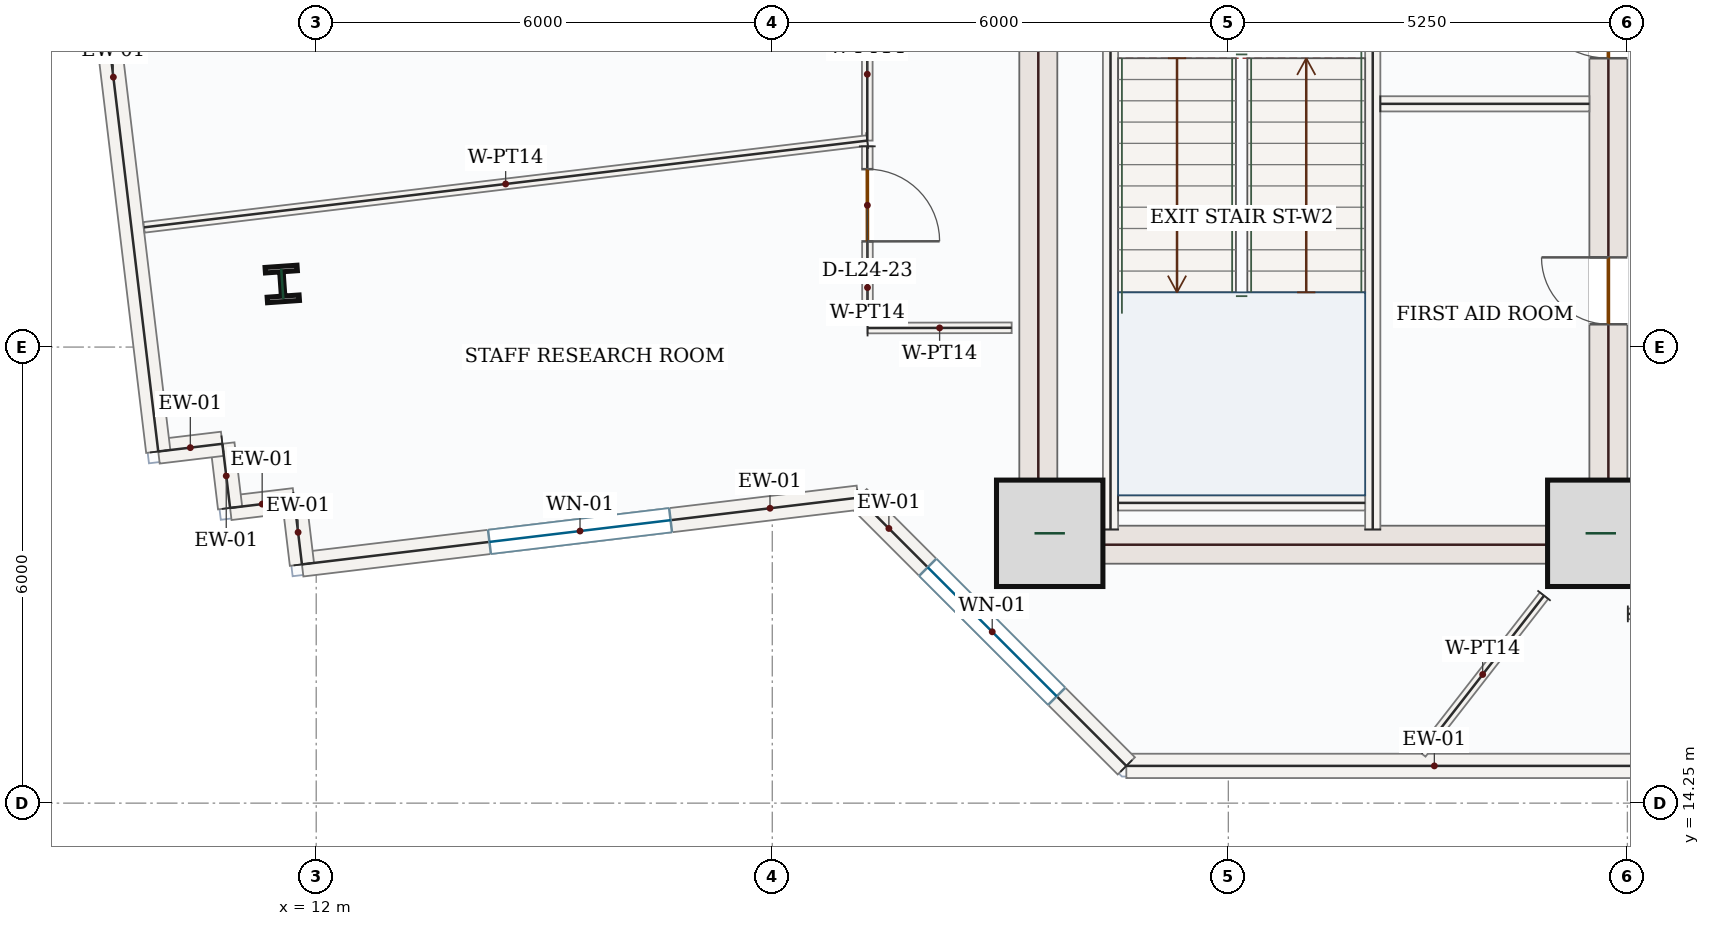
"""IFC4 building model, lengths in metres.
Left out: names, types, materials, properties, quantities, classifications, styles, units other than length and angle.
Written with IfcOpenShell. Run it as: python <this file> out.ifc"""

import sys

from ifc_helpers import new_model, si_unit, direction, frame, frame_2d, origin, origin_2d, place, context, subcontext, project, spatial, rectangle, i_section, extrude, source, transform, mapped, element, fill, save


model = new_model("IFC4")
c1 = context("Model", 3, precision=1e-05, world=origin(), true_north=direction((0.0, 1.0)))
c2 = subcontext(c1, "Body", "Model", "MODEL_VIEW")
j1 = project(units=[si_unit("LENGTHUNIT", "METRE"), si_unit("PLANEANGLEUNIT", "RADIAN")], contexts=[c1])
p1 = place(None, origin())
s1 = spatial("IfcSite", under=j1, at=p1, CompositionType="ELEMENT")
p2 = place(p1, origin())
s2 = spatial("IfcBuilding", under=s1, at=p2, CompositionType="ELEMENT")
p3 = place(p2, frame((0.0, 0.0, 108.9)))
s3 = spatial("IfcBuildingStorey", under=s2, at=p3, CompositionType="ELEMENT", Elevation=108.9)
m1 = source(origin(), c2, "Body", "SweptSolid", [
    extrude(rectangle(XDim=8.55, YDim=0.5, at=frame_2d((4.275, 0.0))), origin(), (0.0, 0.0, 1.0), 3.95),
])
p4 = place(p3, frame((21.5, 17.4, 0.0), z_axis=(0.0, 0.0, 1.0), x_axis=(0.0, 1.0, 0.0)))
e1 = element("IfcWall", 1, at=p4, inside=s3, PredefinedType="SHEAR", context=c2, shape_type="MappedRepresentation", body=[
    mapped(m1, transform((0.0, 0.0, 0.0), x_axis=(1.0, 0.0, 0.0), y_axis=(0.0, 1.0, 0.0), z_axis=(0.0, 0.0, 1.0), scale=1.0)),
])
p5 = place(p3, frame((29.0, 17.4, 0.0), z_axis=(0.0, 0.0, 1.0), x_axis=(0.0, 1.0, 0.0)))
e2 = element("IfcWall", 2, at=p5, inside=s3, PredefinedType="SHEAR", context=c2, shape_type="SweptSolid", body=[
    extrude(rectangle(XDim=8.55, YDim=0.5, at=frame_2d((4.275, 0.0))), origin(), (0.0, 0.0, 1.0), 3.95),
])
p6 = place(p5, frame((6.65, 0.0, 0.0)))
e3 = element("IfcOpeningElement", 3, at=p6, cuts=e2, PredefinedType="OPENING", context=c2, shape_type="SweptSolid", body=[
    extrude(rectangle(XDim=1.1, YDim=2.2, at=frame_2d((0.55, 1.1))), frame((0.0, 0.26, 0.0), z_axis=(0.0, -1.0, 0.0), x_axis=(1.0, 0.0, 0.0)), (0.0, 0.0, 1.0), 0.52),
])
p7 = place(p5, frame((3.15, 0.0, 0.0)))
e4 = element("IfcOpeningElement", 4, at=p7, cuts=e2, PredefinedType="OPENING", context=c2, shape_type="SweptSolid", body=[
    extrude(rectangle(XDim=0.88, YDim=2.1, at=frame_2d((0.44, 1.05))), frame((0.0, 0.26, 0.0), z_axis=(0.0, -1.0, 0.0), x_axis=(1.0, 0.0, 0.0)), (0.0, 0.0, 1.0), 0.52),
])
m2 = source(origin(), c2, "Body", "SweptSolid", [
    extrude(rectangle(XDim=7.0, YDim=0.5, at=frame_2d((3.5, 0.0))), origin(), (0.0, 0.0, 1.0), 3.95),
])
p8 = place(p3, frame((21.75, 17.65, 0.0), z_axis=(0.0, 0.0, 1.0), x_axis=(1.0, 0.0, 0.0)))
e5 = element("IfcWall", 5, at=p8, inside=s3, PredefinedType="SHEAR", context=c2, shape_type="MappedRepresentation", body=[
    mapped(m2, transform((0.0, 0.0, 0.0), x_axis=(1.0, 0.0, 0.0), y_axis=(0.0, 1.0, 0.0), z_axis=(0.0, 0.0, 1.0), scale=1.0)),
])
m3 = source(origin(), c2, "Body", "SweptSolid", [
    extrude(rectangle(XDim=1.4, YDim=1.4, at=origin_2d()), origin(), (0.0, 0.0, 1.0), 4.2),
])
for number, where, z_axis, x_axis in (
    (6, (21.65, 17.8, 0.0), (0.0, 0.0, 1.0), (1.0, 0.0, 0.0)),
    (7, (28.9, 17.8, 0.0), (0.0, 0.0, 1.0), (1.0, 0.0, 0.0)),
):
    element("IfcColumn", number, at=place(p3, frame(where, z_axis=z_axis, x_axis=x_axis)), inside=s3, PredefinedType="COLUMN", context=c2, shape_type="MappedRepresentation", body=[
        mapped(m3, transform((0.0, 0.0, 0.0), x_axis=(1.0, 0.0, 0.0), y_axis=(0.0, 1.0, 0.0), z_axis=(0.0, 0.0, 1.0), scale=1.0)),
    ])
m4 = source(origin(), c2, "Body", "SweptSolid", [
    extrude(i_section(OverallWidth=0.421, OverallDepth=0.465, WebThickness=0.045, FlangeThickness=0.073, FilletRadius=0.018, at=origin_2d()), origin(), (0.0, 0.0, 1.0), 4.2),
])
p9 = place(p3, frame((11.553, 21.08, 0.0), z_axis=(0.0, 0.0, 1.0), x_axis=(0.99756405026, 0.069756473744, 0.0)))
e8 = element("IfcColumn", 8, at=p9, inside=s3, PredefinedType="COLUMN", context=c2, shape_type="MappedRepresentation", body=[
    mapped(m4, transform((0.0, 0.0, 0.0), x_axis=(1.0, 0.0, 0.0), y_axis=(0.0, 1.0, 0.0), z_axis=(0.0, 0.0, 1.0), scale=1.0)),
])
m5 = source(origin(), c2, "Body", "SweptSolid", [
    extrude(rectangle(XDim=8.105, YDim=0.32, at=frame_2d((4.052, 0.0))), origin(), (0.0, 0.0, 1.0), 3.95),
])
p10 = place(p3, frame((30.763, 14.74, 0.0), z_axis=(0.0, 0.0, 1.0), x_axis=(-1.0, 0.0, 0.0)))
e9 = element("IfcWall", 9, at=p10, inside=s3, PredefinedType="SOLIDWALL", context=c2, shape_type="MappedRepresentation", body=[
    mapped(m5, transform((0.0, 0.0, 0.0), x_axis=(1.0, 0.0, 0.0), y_axis=(0.0, 1.0, 0.0), z_axis=(0.0, 0.0, 1.0), scale=1.0)),
])
p11 = place(p3, frame((22.658, 14.74, 0.0), z_axis=(0.0, 0.0, 1.0), x_axis=(-0.707106781187, 0.707106781187, 0.0)))
e10 = element("IfcWall", 10, at=p11, inside=s3, PredefinedType="SOLIDWALL", context=c2, shape_type="SweptSolid", body=[
    extrude(rectangle(XDim=4.99, YDim=0.32, at=frame_2d((2.495, 0.0))), origin(), (0.0, 0.0, 1.0), 3.95),
])
p12 = place(p11, frame((1.295, 0.0, 0.85)))
e11 = element("IfcOpeningElement", 11, at=p12, cuts=e10, PredefinedType="OPENING", context=c2, shape_type="SweptSolid", body=[
    extrude(rectangle(XDim=2.4, YDim=1.8, at=frame_2d((1.2, 0.9))), frame((0.0, 0.17, 0.0), z_axis=(0.0, -1.0, 0.0), x_axis=(1.0, 0.0, 0.0)), (0.0, 0.0, 1.0), 0.34),
])
p13 = place(p3, frame((19.129, 18.269, 0.0), z_axis=(0.0, 0.0, 1.0), x_axis=(-0.992882794037, -0.119095580547, 0.0)))
e12 = element("IfcWall", 12, at=p13, inside=s3, PredefinedType="SOLIDWALL", context=c2, shape_type="SweptSolid", body=[
    extrude(rectangle(XDim=7.37, YDim=0.32, at=frame_2d((3.685, 0.0))), origin(), (0.0, 0.0, 1.0), 3.95),
])
p14 = place(p13, frame((2.485, 0.0, 0.85)))
e13 = element("IfcOpeningElement", 13, at=p14, cuts=e12, PredefinedType="OPENING", context=c2, shape_type="SweptSolid", body=[
    extrude(rectangle(XDim=2.4, YDim=1.8, at=frame_2d((1.2, 0.9))), frame((0.0, 0.17, 0.0), z_axis=(0.0, -1.0, 0.0), x_axis=(1.0, 0.0, 0.0)), (0.0, 0.0, 1.0), 0.34),
])
m6 = source(origin(), c2, "Body", "SweptSolid", [
    extrude(rectangle(XDim=0.85, YDim=0.32, at=frame_2d((0.425, 0.0))), origin(), (0.0, 0.0, 1.0), 3.95),
])
for number, where, z_axis, x_axis in (
    (14, (11.812, 17.391, 0.0), (0.0, 0.0, 1.0), (-0.119, 0.993, 0.0)),
    (15, (11.711, 18.235, 0.0), (0.0, 0.0, 1.0), (-0.993, -0.119, 0.0)),
):
    element("IfcWall", number, at=place(p3, frame(where, z_axis=z_axis, x_axis=x_axis)), inside=s3, PredefinedType="SOLIDWALL", context=c2, shape_type="MappedRepresentation", body=[
        mapped(m6, transform((0.0, 0.0, 0.0), x_axis=(1.0, 0.0, 0.0), y_axis=(0.0, 1.0, 0.0), z_axis=(0.0, 0.0, 1.0), scale=1.0)),
    ])
m7 = source(origin(), c2, "Body", "SweptSolid", [
    extrude(rectangle(XDim=0.85, YDim=0.32, at=frame_2d((0.425, 0.0))), origin(), (0.0, 0.0, 1.0), 3.95),
])
p15 = place(p3, frame((10.867, 18.134, 0.0), z_axis=(0.0, 0.0, 1.0), x_axis=(-0.11894130009, 0.992901287708, 0.0)))
e16 = element("IfcWall", 16, at=p15, inside=s3, PredefinedType="SOLIDWALL", context=c2, shape_type="MappedRepresentation", body=[
    mapped(m7, transform((0.0, 0.0, 0.0), x_axis=(1.0, 0.0, 0.0), y_axis=(0.0, 1.0, 0.0), z_axis=(0.0, 0.0, 1.0), scale=1.0)),
])
p16 = place(p3, frame((10.766, 18.978, 0.0), z_axis=(0.0, 0.0, 1.0), x_axis=(-0.992905350382, -0.118907380694, 0.0)))
e17 = element("IfcWall", 17, at=p16, inside=s3, PredefinedType="SOLIDWALL", context=c2, shape_type="MappedRepresentation", body=[
    mapped(m6, transform((0.0, 0.0, 0.0), x_axis=(1.0, 0.0, 0.0), y_axis=(0.0, 1.0, 0.0), z_axis=(0.0, 0.0, 1.0), scale=1.0)),
])
m8 = source(origin(), c2, "Body", "SweptSolid", [
    extrude(rectangle(XDim=9.92, YDim=0.32, at=frame_2d((4.96, 0.0))), origin(), (0.0, 0.0, 1.0), 3.95),
])
p17 = place(p3, frame((9.922, 18.876, 0.0), z_axis=(0.0, 0.0, 1.0), x_axis=(-0.119092815244, 0.992883125729, 0.0)))
e18 = element("IfcWall", 18, at=p17, inside=s3, PredefinedType="SOLIDWALL", context=c2, shape_type="MappedRepresentation", body=[
    mapped(m8, transform((0.0, 0.0, 0.0), x_axis=(1.0, 0.0, 0.0), y_axis=(0.0, 1.0, 0.0), z_axis=(0.0, 0.0, 1.0), scale=1.0)),
])
m9 = source(origin(), c2, "Body", "SweptSolid", [
    extrude(rectangle(XDim=7.87, YDim=0.2, at=frame_2d((3.935, 0.0))), origin(), (0.0, 0.0, 1.0), 3.95),
])
p18 = place(p3, frame((22.45, 17.85, 0.0), z_axis=(0.0, 0.0, 1.0), x_axis=(0.0, 1.0, 0.0)))
e19 = element("IfcWall", 19, at=p18, inside=s3, PredefinedType="SOLIDWALL", context=c2, shape_type="MappedRepresentation", body=[
    mapped(m9, transform((0.0, 0.0, 0.0), x_axis=(1.0, 0.0, 0.0), y_axis=(0.0, 1.0, 0.0), z_axis=(0.0, 0.0, 1.0), scale=1.0)),
])
p19 = place(p3, frame((25.9, 17.85, 0.0), z_axis=(0.0, 0.0, 1.0), x_axis=(0.0, 1.0, 0.0)))
e20 = element("IfcWall", 20, at=p19, inside=s3, PredefinedType="SOLIDWALL", context=c2, shape_type="SweptSolid", body=[
    extrude(rectangle(XDim=8.0, YDim=0.2, at=frame_2d((4.0, 0.0))), origin(), (0.0, 0.0, 1.0), 3.95),
])
p20 = place(p19, frame((6.3, 0.0, 0.0)))
e21 = element("IfcOpeningElement", 21, at=p20, cuts=e20, PredefinedType="OPENING", context=c2, shape_type="SweptSolid", body=[
    extrude(rectangle(XDim=1.05, YDim=2.15, at=frame_2d((0.525, 1.075))), frame((0.0, 0.11, 0.0), z_axis=(0.0, -1.0, 0.0), x_axis=(1.0, 0.0, 0.0)), (0.0, 0.0, 1.0), 0.22),
])
m10 = source(origin(), c2, "Body", "SweptSolid", [
    extrude(rectangle(XDim=3.25, YDim=0.2, at=frame_2d((1.625, 0.0))), origin(), (0.0, 0.0, 1.0), 3.95),
])
p21 = place(p3, frame((22.55, 18.2, 0.0), z_axis=(0.0, 0.0, 1.0), x_axis=(1.0, 0.0, 0.0)))
e22 = element("IfcWall", 22, at=p21, inside=s3, PredefinedType="SOLIDWALL", context=c2, shape_type="MappedRepresentation", body=[
    mapped(m10, transform((0.0, 0.0, 0.0), x_axis=(1.0, 0.0, 0.0), y_axis=(0.0, 1.0, 0.0), z_axis=(0.0, 0.0, 1.0), scale=1.0)),
])
m11 = source(origin(), c2, "Body", "SweptSolid", [
    extrude(rectangle(XDim=2.75, YDim=0.2, at=frame_2d((1.375, 0.0))), origin(), (0.0, 0.0, 1.0), 3.95),
])
p22 = place(p3, frame((26.0, 23.45, 0.0), z_axis=(0.0, 0.0, 1.0), x_axis=(1.0, 0.0, 0.0)))
e23 = element("IfcWall", 23, at=p22, inside=s3, PredefinedType="SOLIDWALL", context=c2, shape_type="MappedRepresentation", body=[
    mapped(m11, transform((0.0, 0.0, 0.0), x_axis=(1.0, 0.0, 0.0), y_axis=(0.0, 1.0, 0.0), z_axis=(0.0, 0.0, 1.0), scale=1.0)),
])
p23 = place(p3, frame((19.25, 26.834, 0.0), z_axis=(0.0, 0.0, 1.0), x_axis=(0.0, -1.0, 0.0)))
e24 = element("IfcWall", 24, at=p23, inside=s3, PredefinedType="PARTITIONING", context=c2, shape_type="SweptSolid", body=[
    extrude(rectangle(XDim=3.868, YDim=0.14, at=frame_2d((1.934, 0.0))), origin(), (0.0, 0.0, 1.0), 3.95),
])
p24 = place(p23, frame((1.021, 0.0, 0.0)))
e25 = element("IfcOpeningElement", 25, at=p24, cuts=e24, PredefinedType="OPENING", context=c2, shape_type="SweptSolid", body=[
    extrude(rectangle(XDim=0.95, YDim=2.15, at=frame_2d((0.475, 1.075))), frame((0.0, 0.08, 0.0), z_axis=(0.0, -1.0, 0.0), x_axis=(1.0, 0.0, 0.0)), (0.0, 0.0, 1.0), 0.16),
])
m12 = source(origin(), c2, "Body", "SweptSolid", [
    extrude(rectangle(XDim=9.584, YDim=0.14, at=frame_2d((4.792, 0.0))), origin(), (0.0, 0.0, 1.0), 3.95),
])
p25 = place(p3, frame((19.25, 22.966, 0.0), z_axis=(0.0, 0.0, 1.0), x_axis=(-0.992883225705, -0.119091981737, 0.0)))
e26 = element("IfcWall", 26, at=p25, inside=s3, PredefinedType="PARTITIONING", context=c2, shape_type="MappedRepresentation", body=[
    mapped(m12, transform((0.0, 0.0, 0.0), x_axis=(1.0, 0.0, 0.0), y_axis=(0.0, 1.0, 0.0), z_axis=(0.0, 0.0, 1.0), scale=1.0)),
])
m13 = source(origin(), c2, "Body", "SweptSolid", [
    extrude(rectangle(XDim=1.896, YDim=0.14, at=frame_2d((0.948, 0.0))), origin(), (0.0, 0.0, 1.0), 3.95),
])
p26 = place(p3, frame((19.253, 20.5, 0.0), z_axis=(0.0, 0.0, 1.0), x_axis=(0.999998598926, 0.001673961085, 0.0)))
e27 = element("IfcWall", 27, at=p26, inside=s3, PredefinedType="PARTITIONING", context=c2, shape_type="MappedRepresentation", body=[
    mapped(m13, transform((0.0, 0.0, 0.0), x_axis=(1.0, 0.0, 0.0), y_axis=(0.0, 1.0, 0.0), z_axis=(0.0, 0.0, 1.0), scale=1.0)),
])
m14 = source(origin(), c2, "Body", "SweptSolid", [
    extrude(rectangle(XDim=2.629, YDim=0.14, at=frame_2d((1.315, 0.0))), origin(), (0.0, 0.0, 1.0), 3.95),
])
p27 = place(p3, frame((28.154, 16.98, 0.0), z_axis=(0.0, 0.0, 1.0), x_axis=(-0.614210560268, -0.789142184689, 0.0)))
e28 = element("IfcWall", 28, at=p27, inside=s3, PredefinedType="PARTITIONING", context=c2, shape_type="MappedRepresentation", body=[
    mapped(m14, transform((0.0, 0.0, 0.0), x_axis=(1.0, 0.0, 0.0), y_axis=(0.0, 1.0, 0.0), z_axis=(0.0, 0.0, 1.0), scale=1.0)),
])
p28 = place(p3, frame((19.25, 22.891, 0.0), z_axis=(0.0, 0.0, 1.0), x_axis=(0.001476168784, -0.999998910462, 0.0)))
e29 = element("IfcWall", 29, at=p28, inside=s3, PredefinedType="PARTITIONING", context=c2, shape_type="SweptSolid", body=[
    extrude(rectangle(XDim=2.315, YDim=0.14, at=frame_2d((1.158, 0.0))), origin(), (0.0, 0.0, 1.0), 3.95),
])
p29 = place(p28, frame((0.3, 0.0, 0.0)))
e30 = element("IfcOpeningElement", 30, at=p29, cuts=e29, PredefinedType="OPENING", context=c2, shape_type="SweptSolid", body=[
    extrude(rectangle(XDim=0.95, YDim=2.15, at=frame_2d((0.475, 1.075))), frame((0.0, 0.08, 0.0), z_axis=(0.0, -1.0, 0.0), x_axis=(1.0, 0.0, 0.0)), (0.0, 0.0, 1.0), 0.16),
])
p30 = place(p3, frame((29.256, 16.74, 0.0), z_axis=(0.0, 0.0, 1.0), x_axis=(1.0, 0.0, 0.0)))
e31 = element("IfcWall", 31, at=p30, inside=s3, PredefinedType="PARTITIONING", context=c2, shape_type="SweptSolid", body=[
    extrude(rectangle(XDim=13.488, YDim=0.14, at=frame_2d((6.744, 0.0))), origin(), (0.0, 0.0, 1.0), 3.95),
])
p31 = place(p30, frame((6.269, 0.0, 0.0)))
e32 = element("IfcOpeningElement", 32, at=p31, cuts=e31, PredefinedType="OPENING", context=c2, shape_type="SweptSolid", body=[
    extrude(rectangle(XDim=0.95, YDim=2.15, at=frame_2d((0.475, 1.075))), frame((0.0, 0.08, 0.0), z_axis=(0.0, -1.0, 0.0), x_axis=(1.0, 0.0, 0.0)), (0.0, 0.0, 1.0), 0.16),
])
m15 = source(origin(), c2, "Body", "SweptSolid", [
    extrude(rectangle(XDim=2.4, YDim=1.8, at=frame_2d((1.2, 0.9))), frame((0.0, 0.03, 0.0), z_axis=(0.0, -1.0, 0.0), x_axis=(1.0, 0.0, 0.0)), (0.0, 0.0, 1.0), 0.06),
])
p32 = place(p12, origin())
e33 = element("IfcWindow", 33, at=p32, inside=s3, PartitioningType="DOUBLE_PANEL_VERTICAL", PredefinedType="WINDOW", context=c2, shape_type="MappedRepresentation", body=[
    mapped(m15, transform((0.0, 0.0, 0.0), x_axis=(1.0, 0.0, 0.0), y_axis=(0.0, 1.0, 0.0), z_axis=(0.0, 0.0, 1.0), scale=1.0)),
])
fill(e11, e33)
p33 = place(p14, origin())
e34 = element("IfcWindow", 34, at=p33, inside=s3, PartitioningType="DOUBLE_PANEL_VERTICAL", PredefinedType="WINDOW", context=c2, shape_type="MappedRepresentation", body=[
    mapped(m15, transform((0.0, 0.0, 0.0), x_axis=(1.0, 0.0, 0.0), y_axis=(0.0, 1.0, 0.0), z_axis=(0.0, 0.0, 1.0), scale=1.0)),
])
fill(e13, e34)
m16 = source(origin(), c2, "Body", "SweptSolid", [
    extrude(rectangle(XDim=1.1, YDim=2.2, at=frame_2d((0.55, 1.1))), frame((0.0, 0.025, 0.0), z_axis=(0.0, -1.0, 0.0), x_axis=(1.0, 0.0, 0.0)), (0.0, 0.0, 1.0), 0.05),
])
p34 = place(p6, origin())
e35 = element("IfcDoor", 35, at=p34, inside=s3, OperationType="SINGLE_SWING_RIGHT", PredefinedType="DOOR", context=c2, shape_type="MappedRepresentation", body=[
    mapped(m16, transform((0.0, 0.0, 0.0), x_axis=(1.0, 0.0, 0.0), y_axis=(0.0, 1.0, 0.0), z_axis=(0.0, 0.0, 1.0), scale=1.0)),
])
fill(e3, e35)
m17 = source(origin(), c2, "Body", "SweptSolid", [
    extrude(rectangle(XDim=0.88, YDim=2.1, at=frame_2d((0.44, 1.05))), frame((0.0, 0.025, 0.0), z_axis=(0.0, -1.0, 0.0), x_axis=(1.0, 0.0, 0.0)), (0.0, 0.0, 1.0), 0.05),
])
p35 = place(p7, origin())
e36 = element("IfcDoor", 36, at=p35, inside=s3, OperationType="SINGLE_SWING_RIGHT", PredefinedType="DOOR", context=c2, shape_type="MappedRepresentation", body=[
    mapped(m17, transform((0.0, 0.0, 0.0), x_axis=(1.0, 0.0, 0.0), y_axis=(0.0, 1.0, 0.0), z_axis=(0.0, 0.0, 1.0), scale=1.0)),
])
fill(e4, e36)
m18 = source(origin(), c2, "Body", "SweptSolid", [
    extrude(rectangle(XDim=0.95, YDim=2.15, at=frame_2d((0.475, 1.075))), frame((0.0, 0.025, 0.0), z_axis=(0.0, -1.0, 0.0), x_axis=(1.0, 0.0, 0.0)), (0.0, 0.0, 1.0), 0.05),
])
p36 = place(p29, origin())
e37 = element("IfcDoor", 37, at=p36, inside=s3, OperationType="SINGLE_SWING_RIGHT", PredefinedType="DOOR", context=c2, shape_type="MappedRepresentation", body=[
    mapped(m18, transform((0.0, 0.0, 0.0), x_axis=(1.0, 0.0, 0.0), y_axis=(0.0, 1.0, 0.0), z_axis=(0.0, 0.0, 1.0), scale=1.0)),
])
fill(e30, e37)
save(model, sys.argv[1])
